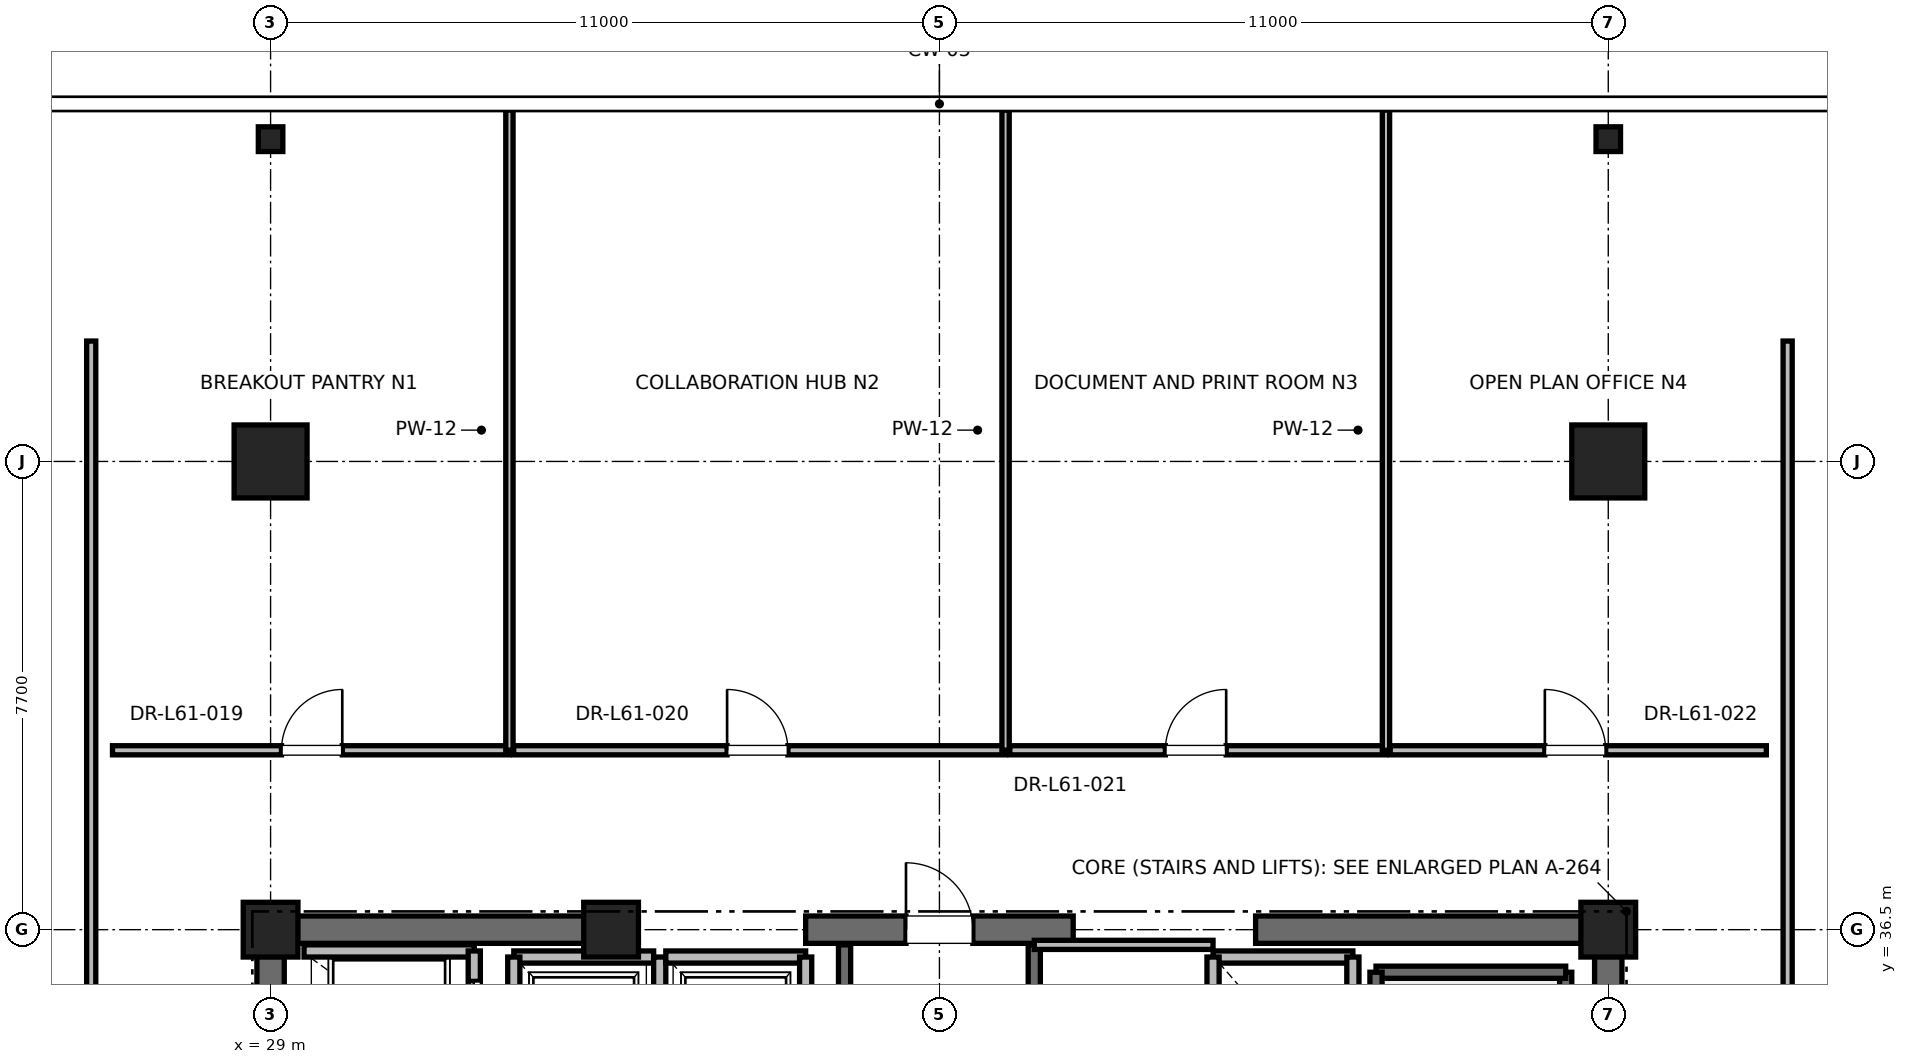
"""IFC4 building model, lengths in metres.
Left out: names, types, materials, properties, quantities, classifications, styles, units other than length and angle.
Written with IfcOpenShell. Run it as: python <this file> out.ifc"""

import sys

from ifc_helpers import new_model, si_unit, direction, frame, frame_2d, origin, origin_2d, place, context, subcontext, project, spatial, rectangle, i_section, extrude, element, fill, save


model = new_model("IFC4")
c1 = context("Model", 3, precision=1e-05, world=origin(), true_north=direction((0.0, 1.0)))
c2 = subcontext(c1, "Body", "Model", "MODEL_VIEW")
j1 = project(units=[si_unit("LENGTHUNIT", "METRE"), si_unit("PLANEANGLEUNIT", "RADIAN")], contexts=[c1])
p1 = place(None, origin())
s1 = spatial("IfcSite", under=j1, at=p1, CompositionType="ELEMENT")
p2 = place(p1, origin())
s2 = spatial("IfcBuilding", under=s1, at=p2, CompositionType="ELEMENT")
p3 = place(p2, frame((0.0, 0.0, 263.2)))
s3 = spatial("IfcBuildingStorey", under=s2, at=p3, CompositionType="ELEMENT", Elevation=263.2)
for number, where, z_axis, x_axis in (
    (1, (29.0, 44.2, 0.0), (0.0, 0.0, 1.0), (1.0, 0.0, 0.0)),
    (2, (51.0, 44.2, 0.0), (0.0, 0.0, 1.0), (1.0, 0.0, 0.0)),
):
    element("IfcColumn", number, at=place(p3, frame(where, z_axis=z_axis, x_axis=x_axis)), inside=s3, PredefinedType="COLUMN", context=c2, shape_type="SweptSolid", body=[
        extrude(rectangle(XDim=1.2, YDim=1.2, at=origin_2d()), origin(), (0.0, 0.0, 1.0), 4.0),
    ])
for number, where, z_axis, x_axis in (
    (3, (29.0, 49.5, 0.0), (0.0, 0.0, 1.0), (1.0, 0.0, 0.0)),
    (4, (51.0, 49.5, 0.0), (0.0, 0.0, 1.0), (1.0, 0.0, 0.0)),
):
    element("IfcColumn", number, at=place(p3, frame(where, z_axis=z_axis, x_axis=x_axis)), inside=s3, PredefinedType="COLUMN", context=c2, shape_type="SweptSolid", body=[
        extrude(i_section(OverallWidth=0.403, OverallDepth=0.406, WebThickness=0.027, FlangeThickness=0.043, FilletRadius=0.015, at=origin_2d()), origin(), (0.0, 0.0, 1.0), 4.0),
    ])
for number, where, z_axis, x_axis in (
    (5, (29.0, 36.5, 0.0), (0.0, 0.0, 1.0), (1.0, 0.0, 0.0)),
    (6, (51.0, 36.5, 0.0), (0.0, 0.0, 1.0), (1.0, 0.0, 0.0)),
    (7, (34.6, 36.5, 0.0), (0.0, 0.0, 1.0), (1.0, 0.0, 0.0)),
):
    element("IfcColumn", number, at=place(p3, frame(where, z_axis=z_axis, x_axis=x_axis)), inside=s3, PredefinedType="PILASTER", context=c2, shape_type="SweptSolid", body=[
        extrude(rectangle(XDim=0.9, YDim=0.9, at=origin_2d()), origin(), (0.0, 0.0, 1.0), 4.0),
    ])
p4 = place(p3, frame((29.0, 36.5, 0.0), z_axis=(0.0, 0.0, 1.0), x_axis=(1.0, 0.0, 0.0)))
e8 = element("IfcWall", 8, at=p4, inside=s3, PredefinedType="SHEAR", context=c2, shape_type="SweptSolid", body=[
    extrude(rectangle(XDim=5.8, YDim=0.45, at=frame_2d((2.9, 0.0))), origin(), (0.0, 0.0, 1.0), 3.785),
])
p5 = place(p3, frame((37.8, 36.5, 0.0), z_axis=(0.0, 0.0, 1.0), x_axis=(1.0, 0.0, 0.0)))
e9 = element("IfcWall", 9, at=p5, inside=s3, PredefinedType="SHEAR", context=c2, shape_type="SweptSolid", body=[
    extrude(rectangle(XDim=4.4, YDim=0.45, at=frame_2d((2.2, 0.0))), origin(), (0.0, 0.0, 1.0), 3.785),
])
p6 = place(p5, frame((1.65, 0.0, 0.0)))
e10 = element("IfcOpeningElement", 10, at=p6, cuts=e9, PredefinedType="OPENING", context=c2, shape_type="SweptSolid", body=[
    extrude(rectangle(XDim=1.1, YDim=2.15, at=frame_2d((0.55, 1.075))), frame((0.0, 0.225, 0.0), z_axis=(0.0, -1.0, 0.0), x_axis=(1.0, 0.0, 0.0)), (0.0, 0.0, 1.0), 0.45),
])
for number, where, z_axis, x_axis in (
    (11, (45.2, 36.5, 0.0), (0.0, 0.0, 1.0), (1.0, 0.0, 0.0)),
    (12, (29.0, 30.7, 0.0), (0.0, 0.0, 1.0), (0.0, 1.0, 0.0)),
):
    element("IfcWall", number, at=place(p3, frame(where, z_axis=z_axis, x_axis=x_axis)), inside=s3, PredefinedType="SHEAR", context=c2, shape_type="SweptSolid", body=[
        extrude(rectangle(XDim=5.8, YDim=0.45, at=frame_2d((2.9, 0.0))), origin(), (0.0, 0.0, 1.0), 3.785),
    ])
p7 = place(p3, frame((51.0, 27.7, 0.0), z_axis=(0.0, 0.0, 1.0), x_axis=(0.0, 1.0, 0.0)))
e13 = element("IfcWall", 13, at=p7, inside=s3, PredefinedType="SHEAR", context=c2, shape_type="SweptSolid", body=[
    extrude(rectangle(XDim=8.8, YDim=0.45, at=frame_2d((4.4, 0.0))), origin(), (0.0, 0.0, 1.0), 3.785),
])
p8 = place(p3, frame((50.3, 27.65, 0.0), z_axis=(0.0, 0.0, 1.0), x_axis=(0.0, 1.0, 0.0)))
e14 = element("IfcWall", 14, at=p8, inside=s3, PredefinedType="SOLIDWALL", context=c2, shape_type="SweptSolid", body=[
    extrude(rectangle(XDim=8.15, YDim=0.2, at=frame_2d((4.075, 0.0))), origin(), (0.0, 0.0, 1.0), 3.785),
])
p9 = place(p3, frame((47.18, 35.8, 0.0), z_axis=(0.0, 0.0, 1.0), x_axis=(1.0, 0.0, 0.0)))
e15 = element("IfcWall", 15, at=p9, inside=s3, PredefinedType="SOLIDWALL", context=c2, shape_type="SweptSolid", body=[
    extrude(rectangle(XDim=3.12, YDim=0.2, at=frame_2d((1.56, 0.0))), origin(), (0.0, 0.0, 1.0), 3.785),
])
p10 = place(p3, frame((47.18, 27.62, 0.0), z_axis=(0.0, 0.0, 1.0), x_axis=(0.0, 1.0, 0.0)))
e16 = element("IfcWall", 16, at=p10, inside=s3, PredefinedType="SOLIDWALL", context=c2, shape_type="SweptSolid", body=[
    extrude(rectangle(XDim=8.18, YDim=0.2, at=frame_2d((4.09, 0.0))), origin(), (0.0, 0.0, 1.0), 3.785),
])
p11 = place(p3, frame((38.44, 27.38, 0.0), z_axis=(0.0, 0.0, 1.0), x_axis=(0.0, 1.0, 0.0)))
e17 = element("IfcWall", 17, at=p11, inside=s3, PredefinedType="SOLIDWALL", context=c2, shape_type="SweptSolid", body=[
    extrude(rectangle(XDim=8.87, YDim=0.2, at=frame_2d((4.435, 0.0))), origin(), (0.0, 0.0, 1.0), 3.785),
])
p12 = place(p3, frame((41.56, 27.68, 0.0), z_axis=(0.0, 0.0, 1.0), x_axis=(0.0, 1.0, 0.0)))
e18 = element("IfcWall", 18, at=p12, inside=s3, PredefinedType="SOLIDWALL", context=c2, shape_type="SweptSolid", body=[
    extrude(rectangle(XDim=8.57, YDim=0.2, at=frame_2d((4.285, 0.0))), origin(), (0.0, 0.0, 1.0), 3.785),
])
p13 = place(p3, frame((32.35, 36.15, 0.0), z_axis=(0.0, 0.0, 1.0), x_axis=(-1.0, 0.0, 0.0)))
e19 = element("IfcWall", 19, at=p13, inside=s3, PredefinedType="SOLIDWALL", context=c2, shape_type="SweptSolid", body=[
    extrude(rectangle(XDim=2.8, YDim=0.2, at=frame_2d((1.4, 0.0))), origin(), (0.0, 0.0, 1.0), 3.148),
])
p14 = place(p3, frame((32.35, 34.05, 0.0), z_axis=(0.0, 0.0, 1.0), x_axis=(0.0, 1.0, 0.0)))
e20 = element("IfcWall", 20, at=p14, inside=s3, PredefinedType="SOLIDWALL", context=c2, shape_type="SweptSolid", body=[
    extrude(rectangle(XDim=2.1, YDim=0.2, at=frame_2d((1.05, 0.0))), origin(), (0.0, 0.0, 1.0), 3.785),
])
p15 = place(p14, frame((0.5, 0.0, 0.0)))
e21 = element("IfcOpeningElement", 21, at=p15, cuts=e20, PredefinedType="OPENING", context=c2, shape_type="SweptSolid", body=[
    extrude(rectangle(XDim=1.1, YDim=2.2, at=frame_2d((0.55, 1.1))), frame((0.0, 0.1, 0.0), z_axis=(0.0, -1.0, 0.0), x_axis=(1.0, 0.0, 0.0)), (0.0, 0.0, 1.0), 0.2),
])
p16 = place(p3, frame((35.3, 36.05, 0.0), z_axis=(0.0, 0.0, 1.0), x_axis=(-1.0, 0.0, 0.0)))
e22 = element("IfcWall", 22, at=p16, inside=s3, PredefinedType="SOLIDWALL", context=c2, shape_type="SweptSolid", body=[
    extrude(rectangle(XDim=2.3, YDim=0.2, at=frame_2d((1.15, 0.0))), origin(), (0.0, 0.0, 1.0), 2.865),
])
p17 = place(p3, frame((33.0, 36.05, 0.0), z_axis=(0.0, 0.0, 1.0), x_axis=(0.0, -1.0, 0.0)))
e23 = element("IfcWall", 23, at=p17, inside=s3, PredefinedType="SOLIDWALL", context=c2, shape_type="SweptSolid", body=[
    extrude(rectangle(XDim=2.6, YDim=0.2, at=frame_2d((1.3, 0.0))), origin(), (0.0, 0.0, 1.0), 3.785),
])
p18 = place(p3, frame((35.4, 33.45, 0.0), z_axis=(0.0, 0.0, 1.0), x_axis=(0.0, 1.0, 0.0)))
e24 = element("IfcWall", 24, at=p18, inside=s3, PredefinedType="SOLIDWALL", context=c2, shape_type="SweptSolid", body=[
    extrude(rectangle(XDim=2.6, YDim=0.2, at=frame_2d((1.3, 0.0))), origin(), (0.0, 0.0, 1.0), 2.865),
])
p19 = place(p3, frame((37.8, 36.05, 0.0), z_axis=(0.0, 0.0, 1.0), x_axis=(-1.0, 0.0, 0.0)))
e25 = element("IfcWall", 25, at=p19, inside=s3, PredefinedType="SOLIDWALL", context=c2, shape_type="SweptSolid", body=[
    extrude(rectangle(XDim=2.3, YDim=0.2, at=frame_2d((1.15, 0.0))), origin(), (0.0, 0.0, 1.0), 2.865),
])
p20 = place(p3, frame((37.8, 33.45, 0.0), z_axis=(0.0, 0.0, 1.0), x_axis=(0.0, 1.0, 0.0)))
e26 = element("IfcWall", 26, at=p20, inside=s3, PredefinedType="SOLIDWALL", context=c2, shape_type="SweptSolid", body=[
    extrude(rectangle(XDim=2.6, YDim=0.2, at=frame_2d((1.3, 0.0))), origin(), (0.0, 0.0, 1.0), 2.865),
])
p21 = place(p3, frame((46.8, 36.05, 0.0), z_axis=(0.0, 0.0, 1.0), x_axis=(-1.0, 0.0, 0.0)))
e27 = element("IfcWall", 27, at=p21, inside=s3, PredefinedType="SOLIDWALL", context=c2, shape_type="SweptSolid", body=[
    extrude(rectangle(XDim=2.3, YDim=0.2, at=frame_2d((1.15, 0.0))), origin(), (0.0, 0.0, 1.0), 2.865),
])
p22 = place(p3, frame((44.5, 36.05, 0.0), z_axis=(0.0, 0.0, 1.0), x_axis=(0.0, -1.0, 0.0)))
e28 = element("IfcWall", 28, at=p22, inside=s3, PredefinedType="SOLIDWALL", context=c2, shape_type="SweptSolid", body=[
    extrude(rectangle(XDim=2.6, YDim=0.2, at=frame_2d((1.3, 0.0))), origin(), (0.0, 0.0, 1.0), 2.865),
])
p23 = place(p3, frame((46.8, 33.45, 0.0), z_axis=(0.0, 0.0, 1.0), x_axis=(0.0, 1.0, 0.0)))
e29 = element("IfcWall", 29, at=p23, inside=s3, PredefinedType="SOLIDWALL", context=c2, shape_type="SweptSolid", body=[
    extrude(rectangle(XDim=2.6, YDim=0.2, at=frame_2d((1.3, 0.0))), origin(), (0.0, 0.0, 1.0), 3.785),
])
p24 = place(p3, frame((41.56, 36.25, 0.0), z_axis=(0.0, 0.0, 1.0), x_axis=(1.0, 0.0, 0.0)))
e30 = element("IfcWall", 30, at=p24, inside=s3, PredefinedType="PARTITIONING", context=c2, shape_type="SweptSolid", body=[
    extrude(rectangle(XDim=2.94, YDim=0.15, at=frame_2d((1.47, 0.0))), origin(), (0.0, 0.0, 1.0), 2.85),
])
p25 = place(p3, frame((26.4, 39.45, 0.0), z_axis=(0.0, 0.0, 1.0), x_axis=(1.0, 0.0, 0.0)))
e31 = element("IfcWall", 31, at=p25, inside=s3, PredefinedType="PARTITIONING", context=c2, shape_type="SweptSolid", body=[
    extrude(rectangle(XDim=6.528, YDim=0.15, at=frame_2d((3.264, 0.0))), origin(), (0.0, 0.0, 1.0), 2.85),
])
p26 = place(p25, frame((2.779, 0.0, 0.0)))
e32 = element("IfcOpeningElement", 32, at=p26, cuts=e31, PredefinedType="OPENING", context=c2, shape_type="SweptSolid", body=[
    extrude(rectangle(XDim=1.0, YDim=2.15, at=frame_2d((0.5, 1.075))), frame((0.0, 0.075, 0.0), z_axis=(0.0, -1.0, 0.0), x_axis=(1.0, 0.0, 0.0)), (0.0, 0.0, 1.0), 0.15),
])
p27 = place(p3, frame((32.928, 39.45, 0.0), z_axis=(0.0, 0.0, 1.0), x_axis=(0.0, 1.0, 0.0)))
e33 = element("IfcWall", 33, at=p27, inside=s3, PredefinedType="PARTITIONING", context=c2, shape_type="SweptSolid", body=[
    extrude(rectangle(XDim=10.53, YDim=0.12, at=frame_2d((5.265, 0.0))), origin(), (0.0, 0.0, 1.0), 2.415),
])
p28 = place(p3, frame((32.998, 39.45, 0.0), z_axis=(0.0, 0.0, 1.0), x_axis=(1.0, 0.0, 0.0)))
e34 = element("IfcWall", 34, at=p28, inside=s3, PredefinedType="PARTITIONING", context=c2, shape_type="SweptSolid", body=[
    extrude(rectangle(XDim=8.09, YDim=0.15, at=frame_2d((4.045, 0.0))), origin(), (0.0, 0.0, 1.0), 2.85),
])
p29 = place(p28, frame((3.51, 0.0, 0.0)))
e35 = element("IfcOpeningElement", 35, at=p29, cuts=e34, PredefinedType="OPENING", context=c2, shape_type="SweptSolid", body=[
    extrude(rectangle(XDim=1.0, YDim=2.15, at=frame_2d((0.5, 1.075))), frame((0.0, 0.075, 0.0), z_axis=(0.0, -1.0, 0.0), x_axis=(1.0, 0.0, 0.0)), (0.0, 0.0, 1.0), 0.15),
])
p30 = place(p3, frame((41.088, 39.45, 0.0), z_axis=(0.0, 0.0, 1.0), x_axis=(0.0, 1.0, 0.0)))
e36 = element("IfcWall", 36, at=p30, inside=s3, PredefinedType="PARTITIONING", context=c2, shape_type="SweptSolid", body=[
    extrude(rectangle(XDim=10.53, YDim=0.12, at=frame_2d((5.265, 0.0))), origin(), (0.0, 0.0, 1.0), 2.415),
])
p31 = place(p3, frame((41.158, 39.45, 0.0), z_axis=(0.0, 0.0, 1.0), x_axis=(1.0, 0.0, 0.0)))
e37 = element("IfcWall", 37, at=p31, inside=s3, PredefinedType="PARTITIONING", context=c2, shape_type="SweptSolid", body=[
    extrude(rectangle(XDim=6.186, YDim=0.15, at=frame_2d((3.093, 0.0))), origin(), (0.0, 0.0, 1.0), 2.85),
])
p32 = place(p31, frame((2.558, 0.0, 0.0)))
e38 = element("IfcOpeningElement", 38, at=p32, cuts=e37, PredefinedType="OPENING", context=c2, shape_type="SweptSolid", body=[
    extrude(rectangle(XDim=1.0, YDim=2.15, at=frame_2d((0.5, 1.075))), frame((0.0, 0.075, 0.0), z_axis=(0.0, -1.0, 0.0), x_axis=(1.0, 0.0, 0.0)), (0.0, 0.0, 1.0), 0.15),
])
p33 = place(p3, frame((47.344, 39.45, 0.0), z_axis=(0.0, 0.0, 1.0), x_axis=(0.0, 1.0, 0.0)))
e39 = element("IfcWall", 39, at=p33, inside=s3, PredefinedType="PARTITIONING", context=c2, shape_type="SweptSolid", body=[
    extrude(rectangle(XDim=10.53, YDim=0.12, at=frame_2d((5.265, 0.0))), origin(), (0.0, 0.0, 1.0), 2.415),
])
p34 = place(p3, frame((47.414, 39.45, 0.0), z_axis=(0.0, 0.0, 1.0), x_axis=(1.0, 0.0, 0.0)))
e40 = element("IfcWall", 40, at=p34, inside=s3, PredefinedType="PARTITIONING", context=c2, shape_type="SweptSolid", body=[
    extrude(rectangle(XDim=6.186, YDim=0.15, at=frame_2d((3.093, 0.0))), origin(), (0.0, 0.0, 1.0), 2.85),
])
p35 = place(p34, frame((2.543, 0.0, 0.0)))
e41 = element("IfcOpeningElement", 41, at=p35, cuts=e40, PredefinedType="OPENING", context=c2, shape_type="SweptSolid", body=[
    extrude(rectangle(XDim=1.0, YDim=2.15, at=frame_2d((0.5, 1.075))), frame((0.0, 0.075, 0.0), z_axis=(0.0, -1.0, 0.0), x_axis=(1.0, 0.0, 0.0)), (0.0, 0.0, 1.0), 0.15),
])
p36 = place(p3, frame((26.05, 24.581, 0.0), z_axis=(0.0, 0.0, 1.0), x_axis=(0.0, 1.0, 0.0)))
e42 = element("IfcWall", 42, at=p36, inside=s3, PredefinedType="PARTITIONING", context=c2, shape_type="SweptSolid", body=[
    extrude(rectangle(XDim=21.599, YDim=0.15, at=frame_2d((10.799, 0.0))), origin(), (0.0, 0.0, 1.0), 2.85),
])
p37 = place(p36, frame((5.409, 0.0, 0.0)))
e43 = element("IfcOpeningElement", 43, at=p37, cuts=e42, PredefinedType="OPENING", context=c2, shape_type="SweptSolid", body=[
    extrude(rectangle(XDim=1.0, YDim=2.15, at=frame_2d((0.5, 1.075))), frame((0.0, 0.075, 0.0), z_axis=(0.0, -1.0, 0.0), x_axis=(1.0, 0.0, 0.0)), (0.0, 0.0, 1.0), 0.15),
])
p38 = place(p3, frame((53.95, 33.548, 0.0), z_axis=(0.0, 0.0, 1.0), x_axis=(0.0, 1.0, 0.0)))
e44 = element("IfcWall", 44, at=p38, inside=s3, PredefinedType="PARTITIONING", context=c2, shape_type="SweptSolid", body=[
    extrude(rectangle(XDim=12.632, YDim=0.15, at=frame_2d((6.316, 0.0))), origin(), (0.0, 0.0, 1.0), 2.85),
])
p39 = place(p38, frame((0.926, 0.0, 0.0)))
e45 = element("IfcOpeningElement", 45, at=p39, cuts=e44, PredefinedType="OPENING", context=c2, shape_type="SweptSolid", body=[
    extrude(rectangle(XDim=1.0, YDim=2.15, at=frame_2d((0.5, 1.075))), frame((0.0, 0.075, 0.0), z_axis=(0.0, -1.0, 0.0), x_axis=(1.0, 0.0, 0.0)), (0.0, 0.0, 1.0), 0.15),
])
p40 = place(p6, origin())
e46 = element("IfcDoor", 46, at=p40, inside=s3, OperationType="SINGLE_SWING_LEFT", PredefinedType="DOOR", context=c2, shape_type="SweptSolid", body=[
    extrude(rectangle(XDim=1.1, YDim=2.15, at=frame_2d((0.55, 1.075))), frame((0.0, 0.025, 0.0), z_axis=(0.0, -1.0, 0.0), x_axis=(1.0, 0.0, 0.0)), (0.0, 0.0, 1.0), 0.05),
])
fill(e10, e46)
p41 = place(p15, origin())
e47 = element("IfcDoor", 47, at=p41, inside=s3, OperationType="SLIDING_TO_RIGHT", PredefinedType="DOOR", context=c2, shape_type="SweptSolid", body=[
    extrude(rectangle(XDim=1.1, YDim=2.2, at=frame_2d((0.55, 1.1))), frame((0.0, 0.025, 0.0), z_axis=(0.0, -1.0, 0.0), x_axis=(1.0, 0.0, 0.0)), (0.0, 0.0, 1.0), 0.05),
])
fill(e21, e47)
p42 = place(p26, origin())
e48 = element("IfcDoor", 48, at=p42, inside=s3, OperationType="SINGLE_SWING_RIGHT", PredefinedType="DOOR", context=c2, shape_type="SweptSolid", body=[
    extrude(rectangle(XDim=1.0, YDim=2.15, at=frame_2d((0.5, 1.075))), frame((0.0, 0.025, 0.0), z_axis=(0.0, -1.0, 0.0), x_axis=(1.0, 0.0, 0.0)), (0.0, 0.0, 1.0), 0.05),
])
fill(e32, e48)
p43 = place(p29, origin())
e49 = element("IfcDoor", 49, at=p43, inside=s3, OperationType="SINGLE_SWING_LEFT", PredefinedType="DOOR", context=c2, shape_type="SweptSolid", body=[
    extrude(rectangle(XDim=1.0, YDim=2.15, at=frame_2d((0.5, 1.075))), frame((0.0, 0.025, 0.0), z_axis=(0.0, -1.0, 0.0), x_axis=(1.0, 0.0, 0.0)), (0.0, 0.0, 1.0), 0.05),
])
fill(e35, e49)
p44 = place(p32, origin())
e50 = element("IfcDoor", 50, at=p44, inside=s3, OperationType="SINGLE_SWING_RIGHT", PredefinedType="DOOR", context=c2, shape_type="SweptSolid", body=[
    extrude(rectangle(XDim=1.0, YDim=2.15, at=frame_2d((0.5, 1.075))), frame((0.0, 0.025, 0.0), z_axis=(0.0, -1.0, 0.0), x_axis=(1.0, 0.0, 0.0)), (0.0, 0.0, 1.0), 0.05),
])
fill(e38, e50)
p45 = place(p35, origin())
e51 = element("IfcDoor", 51, at=p45, inside=s3, OperationType="SINGLE_SWING_LEFT", PredefinedType="DOOR", context=c2, shape_type="SweptSolid", body=[
    extrude(rectangle(XDim=1.0, YDim=2.15, at=frame_2d((0.5, 1.075))), frame((0.0, 0.025, 0.0), z_axis=(0.0, -1.0, 0.0), x_axis=(1.0, 0.0, 0.0)), (0.0, 0.0, 1.0), 0.05),
])
fill(e41, e51)
save(model, sys.argv[1])
